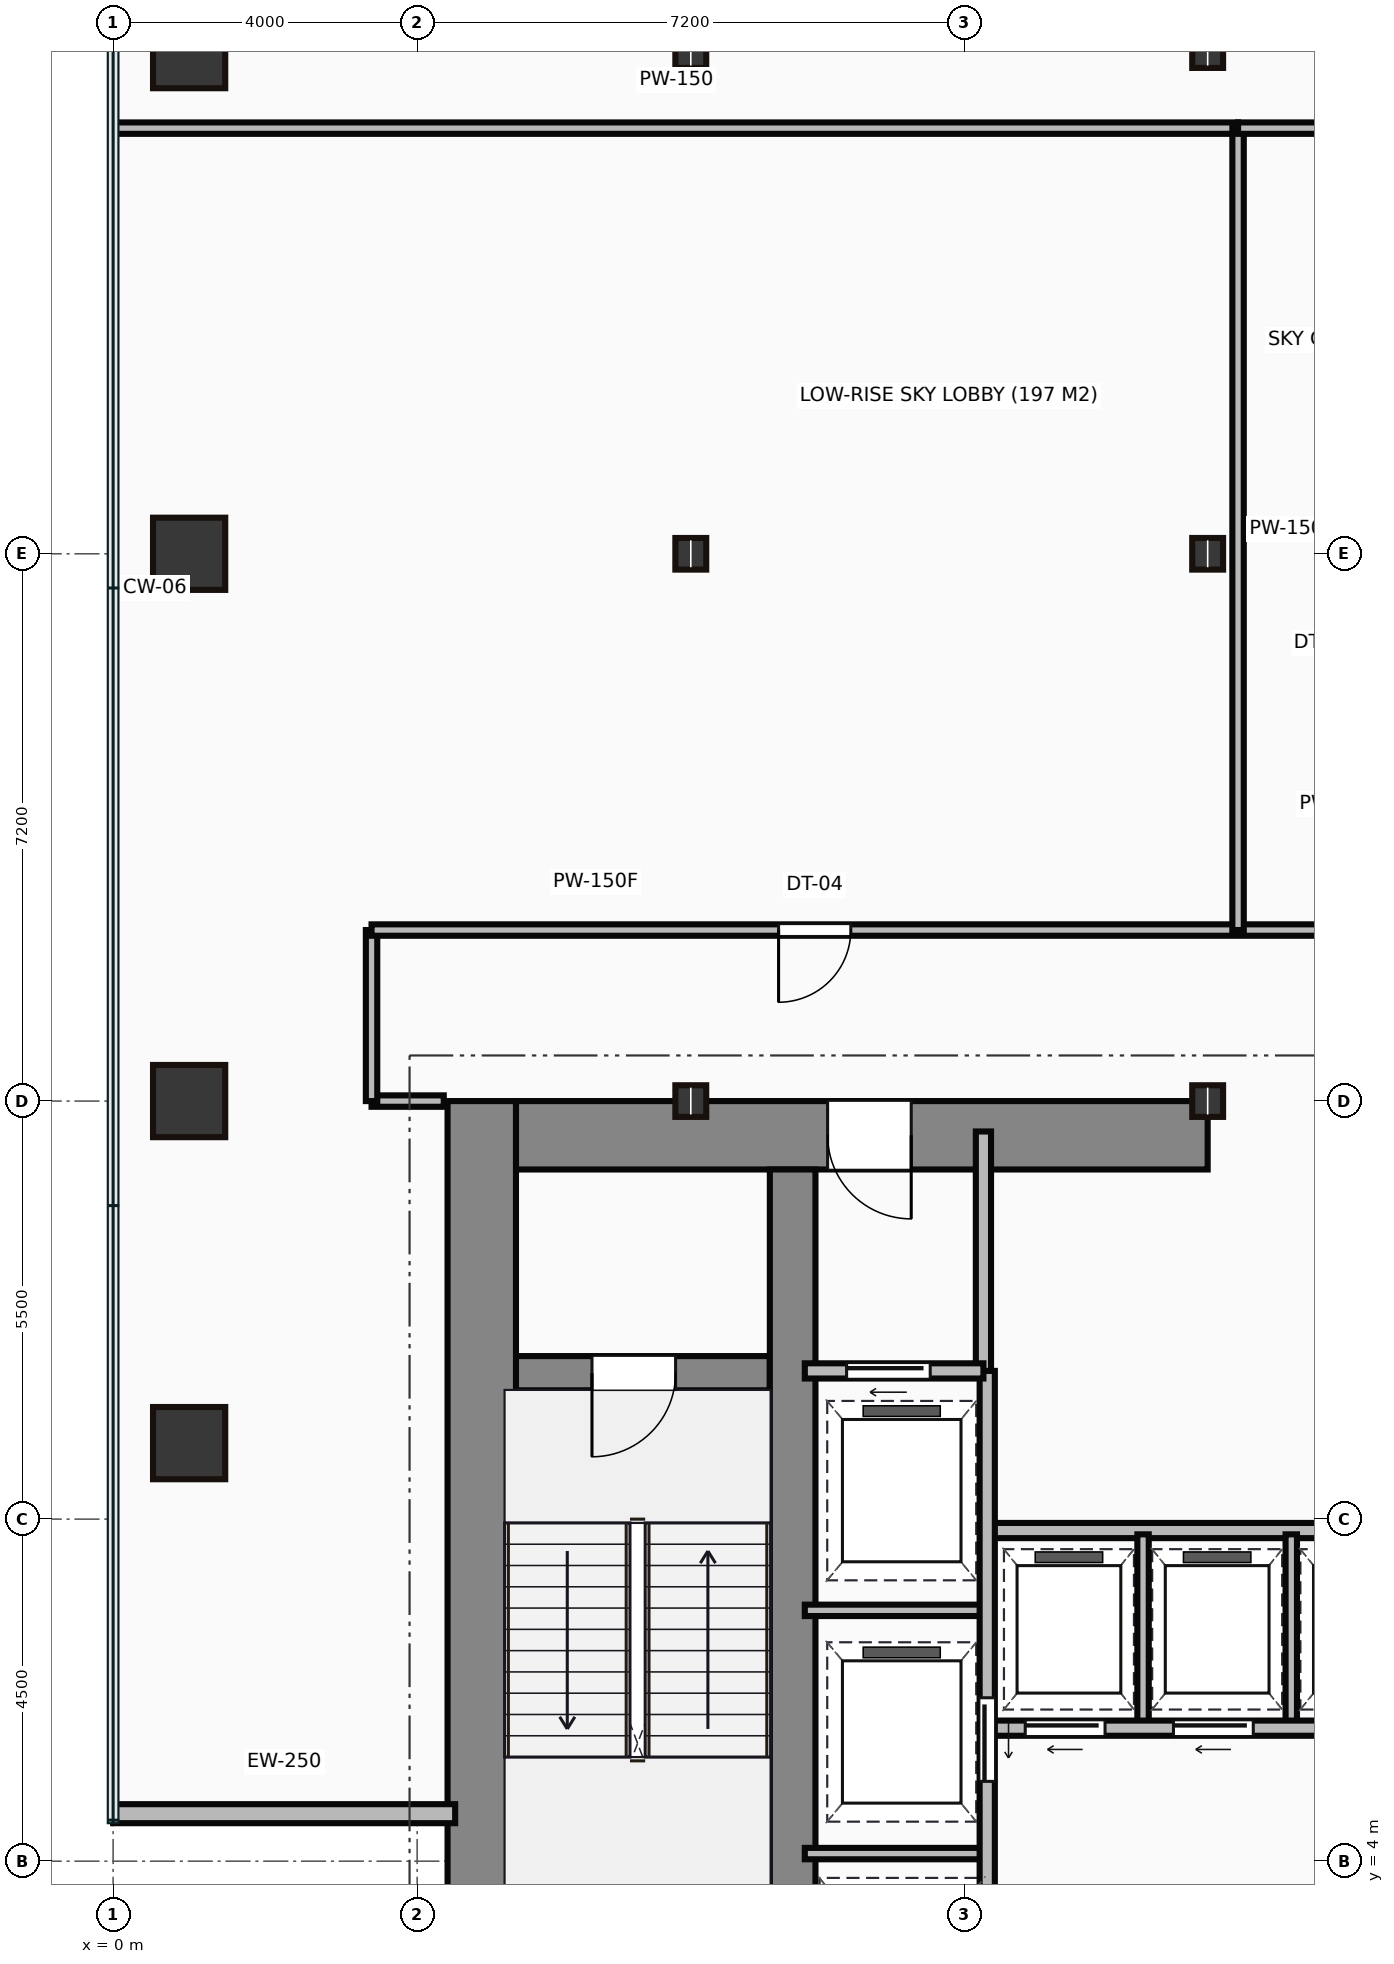
"""IFC4 building model, lengths in metres.
Left out: names, types, materials, properties, quantities, classifications, styles, units other than length and angle.
Written with IfcOpenShell. Run it as: python <this file> out.ifc"""

import sys

from ifc_helpers import new_model, si_unit, direction, frame, frame_2d, origin, origin_2d, place, context, subcontext, project, spatial, rectangle, hollow_rectangle, i_section, extrude, source, transform, mapped, element, fill, save


model = new_model("IFC4")
c1 = context("Model", 3, precision=1e-05, world=origin(), true_north=direction((0.0, 1.0)))
c2 = subcontext(c1, "Body", "Model", "MODEL_VIEW")
j1 = project(units=[si_unit("LENGTHUNIT", "METRE"), si_unit("PLANEANGLEUNIT", "RADIAN")], contexts=[c1])
p1 = place(None, origin())
s1 = spatial("IfcSite", under=j1, at=p1, CompositionType="ELEMENT")
p2 = place(p1, origin())
s2 = spatial("IfcBuilding", under=s1, at=p2, CompositionType="ELEMENT")
p3 = place(p2, frame((0.0, 0.0, 79.95)))
s3 = spatial("IfcBuildingStorey", under=s2, at=p3, CompositionType="ELEMENT", Elevation=79.95)
m1 = source(origin(), c2, "Body", "SweptSolid", [
    extrude(rectangle(XDim=13.1, YDim=0.9, at=frame_2d((6.55, 0.0))), origin(), (0.0, 0.0, 1.0), 4.2),
])
p4 = place(p3, frame((4.85, 0.9, 0.0), z_axis=(0.0, 0.0, 1.0), x_axis=(0.0, 1.0, 0.0)))
e1 = element("IfcWall", 1, at=p4, inside=s3, PredefinedType="SHEAR", context=c2, shape_type="MappedRepresentation", body=[
    mapped(m1, transform((0.0, 0.0, 0.0))),
])
m2 = source(origin(), c2, "Body", "SweptSolid", [
    extrude(rectangle(XDim=9.1, YDim=0.9, at=frame_2d((4.55, 0.0))), origin(), (0.0, 0.0, 1.0), 4.2),
])
p5 = place(p3, frame((5.3, 13.55, 0.0), z_axis=(0.0, 0.0, 1.0), x_axis=(1.0, 0.0, 0.0)))
e2 = element("IfcWall", 2, at=p5, inside=s3, PredefinedType="SHEAR", context=c2, shape_type="MappedRepresentation", body=[
    mapped(m2, transform((0.0, 0.0, 0.0))),
])
p6 = place(p5, frame((4.1, 0.0, 0.0)))
e3 = element("IfcOpeningElement", 3, at=p6, cuts=e2, PredefinedType="OPENING", context=c2, shape_type="SweptSolid", body=[
    extrude(rectangle(XDim=1.1, YDim=2.15, at=frame_2d((0.55, 1.075))), frame((0.0, 0.46, 0.0), z_axis=(0.0, -1.0, 0.0), x_axis=(1.0, 0.0, 0.0)), (0.0, 0.0, 1.0), 0.92),
])
m3 = source(origin(), c2, "Body", "SweptSolid", [
    extrude(rectangle(XDim=12.2, YDim=0.6, at=frame_2d((6.1, 0.0))), origin(), (0.0, 0.0, 1.0), 4.2),
])
p7 = place(p3, frame((8.94, 0.9, 0.0), z_axis=(0.0, 0.0, 1.0), x_axis=(0.0, 1.0, 0.0)))
e4 = element("IfcWall", 4, at=p7, inside=s3, PredefinedType="SHEAR", context=c2, shape_type="MappedRepresentation", body=[
    mapped(m3, transform((0.0, 0.0, 0.0))),
])
m4 = source(origin(), c2, "Body", "SweptSolid", [
    extrude(rectangle(XDim=3.39, YDim=0.45, at=frame_2d((1.695, 0.0))), origin(), (0.0, 0.0, 1.0), 4.2),
])
p8 = place(p3, frame((5.25, 10.42, 0.0), z_axis=(0.0, 0.0, 1.0), x_axis=(1.0, 0.0, 0.0)))
e5 = element("IfcWall", 5, at=p8, inside=s3, PredefinedType="SHEAR", context=c2, shape_type="MappedRepresentation", body=[
    mapped(m4, transform((0.0, 0.0, 0.0))),
])
p9 = place(p8, frame((1.05, 0.0, 0.0)))
e6 = element("IfcOpeningElement", 6, at=p9, cuts=e5, PredefinedType="OPENING", context=c2, shape_type="SweptSolid", body=[
    extrude(rectangle(XDim=1.1, YDim=2.15, at=frame_2d((0.55, 1.075))), frame((0.0, 0.235, 0.0), z_axis=(0.0, -1.0, 0.0), x_axis=(1.0, 0.0, 0.0)), (0.0, 0.0, 1.0), 0.47),
])
m5 = source(origin(), c2, "Body", "SweptSolid", [
    extrude(hollow_rectangle(XDim=0.95, YDim=0.95, WallThickness=0.045, at=origin_2d()), origin(), (0.0, 0.0, 1.0), 4.2),
])
for number, where, z_axis, x_axis in (
    (7, (1.0, 9.5, 0.0), (0.0, 0.0, 1.0), (1.0, 0.0, 0.0)),
    (8, (1.0, 14.0, 0.0), (0.0, 0.0, 1.0), (1.0, 0.0, 0.0)),
    (9, (1.0, 21.2, 0.0), (0.0, 0.0, 1.0), (1.0, 0.0, 0.0)),
    (10, (1.0, 27.8, 0.0), (0.0, 0.0, 1.0), (1.0, 0.0, 0.0)),
):
    element("IfcColumn", number, at=place(p3, frame(where, z_axis=z_axis, x_axis=x_axis)), inside=s3, PredefinedType="COLUMN", context=c2, shape_type="MappedRepresentation", body=[
        mapped(m5, transform((0.0, 0.0, 0.0))),
    ])
m6 = source(origin(), c2, "Body", "SweptSolid", [
    extrude(i_section(OverallWidth=0.406, OverallDepth=0.416, WebThickness=0.03, FlangeThickness=0.048, at=origin_2d()), origin(), (0.0, 0.0, 1.0), 4.2),
])
for number, where, z_axis, x_axis in (
    (11, (7.6, 14.0, 0.0), (0.0, 0.0, 1.0), (1.0, 0.0, 0.0)),
    (12, (7.6, 21.2, 0.0), (0.0, 0.0, 1.0), (1.0, 0.0, 0.0)),
    (13, (7.6, 27.8, 0.0), (0.0, 0.0, 1.0), (1.0, 0.0, 0.0)),
    (14, (14.4, 14.0, 0.0), (0.0, 0.0, 1.0), (1.0, 0.0, 0.0)),
    (15, (14.4, 21.2, 0.0), (0.0, 0.0, 1.0), (1.0, 0.0, 0.0)),
    (16, (14.4, 27.8, 0.0), (0.0, 0.0, 1.0), (1.0, 0.0, 0.0)),
):
    element("IfcColumn", number, at=place(p3, frame(where, z_axis=z_axis, x_axis=x_axis)), inside=s3, PredefinedType="COLUMN", context=c2, shape_type="MappedRepresentation", body=[
        mapped(m6, transform((0.0, 0.0, 0.0))),
    ])
m7 = source(origin(), c2, "Body", "SweptSolid", [
    extrude(rectangle(XDim=4.5, YDim=0.25, at=frame_2d((2.25, 0.0))), origin(), (0.0, 0.0, 1.0), 3.9),
])
p10 = place(p3, frame((0.0, 4.625, 0.0), z_axis=(0.0, 0.0, 1.0), x_axis=(1.0, 0.0, 0.0)))
e17 = element("IfcWall", 17, at=p10, inside=s3, PredefinedType="STANDARD", context=c2, shape_type="MappedRepresentation", body=[
    mapped(m7, transform((0.0, 0.0, 0.0))),
])
m8 = source(origin(), c2, "Body", "SweptSolid", [
    extrude(rectangle(XDim=3.18, YDim=0.2, at=frame_2d((1.59, 0.0))), origin(), (0.0, 0.0, 1.0), 3.9),
])
p11 = place(p3, frame((11.45, 10.42, 0.0), z_axis=(0.0, 0.0, 1.0), x_axis=(0.0, 1.0, 0.0)))
e18 = element("IfcWall", 18, at=p11, inside=s3, PredefinedType="PARTITIONING", context=c2, shape_type="MappedRepresentation", body=[
    mapped(m8, transform((0.0, 0.0, 0.0))),
])
m9 = source(origin(), c2, "Body", "SweptSolid", [
    extrude(rectangle(XDim=2.35, YDim=0.2, at=frame_2d((1.175, 0.0))), origin(), (0.0, 0.0, 1.0), 3.9),
])
p12 = place(p3, frame((9.1, 10.45, 0.0), z_axis=(0.0, 0.0, 1.0), x_axis=(1.0, 0.0, 0.0)))
e19 = element("IfcWall", 19, at=p12, inside=s3, PredefinedType="PARTITIONING", context=c2, shape_type="MappedRepresentation", body=[
    mapped(m9, transform((0.0, 0.0, 0.0))),
])
p13 = place(p12, frame((0.55, 0.0, 0.0)))
e20 = element("IfcOpeningElement", 20, at=p13, cuts=e19, PredefinedType="OPENING", context=c2, shape_type="SweptSolid", body=[
    extrude(rectangle(XDim=1.1, YDim=2.15, at=frame_2d((0.55, 1.075))), frame((0.0, 0.11, 0.0), z_axis=(0.0, -1.0, 0.0), x_axis=(1.0, 0.0, 0.0)), (0.0, 0.0, 1.0), 0.22),
])
m10 = source(origin(), c2, "Body", "SweptSolid", [
    extrude(rectangle(XDim=9.6, YDim=0.2, at=frame_2d((4.8, 0.0))), origin(), (0.0, 0.0, 1.0), 3.9),
])
p14 = place(p3, frame((11.5, 0.85, 0.0), z_axis=(0.0, 0.0, 1.0), x_axis=(0.0, 1.0, 0.0)))
e21 = element("IfcWall", 21, at=p14, inside=s3, PredefinedType="PARTITIONING", context=c2, shape_type="MappedRepresentation", body=[
    mapped(m10, transform((0.0, 0.0, 0.0))),
])
p15 = place(p14, frame((4.2, 0.0, 0.0)))
e22 = element("IfcOpeningElement", 22, at=p15, cuts=e21, PredefinedType="OPENING", context=c2, shape_type="SweptSolid", body=[
    extrude(rectangle(XDim=1.1, YDim=2.15, at=frame_2d((0.55, 1.075))), frame((0.0, 0.11, 0.0), z_axis=(0.0, -1.0, 0.0), x_axis=(1.0, 0.0, 0.0)), (0.0, 0.0, 1.0), 0.22),
])
p16 = place(p14, frame((0.9, 0.0, 0.0)))
e23 = element("IfcOpeningElement", 23, at=p16, cuts=e21, PredefinedType="OPENING", context=c2, shape_type="SweptSolid", body=[
    extrude(rectangle(XDim=1.2, YDim=2.15, at=frame_2d((0.6, 1.075))), frame((0.0, 0.11, 0.0), z_axis=(0.0, -1.0, 0.0), x_axis=(1.0, 0.0, 0.0)), (0.0, 0.0, 1.0), 0.22),
])
m11 = source(origin(), c2, "Body", "SweptSolid", [
    extrude(rectangle(XDim=2.4, YDim=0.15, at=frame_2d((1.2, 0.0))), origin(), (0.0, 0.0, 1.0), 3.9),
])
for number, where, z_axis, x_axis in (
    (24, (9.1, 4.1, 0.0), (0.0, 0.0, 1.0), (1.0, 0.0, 0.0)),
    (25, (9.1, 7.3, 0.0), (0.0, 0.0, 1.0), (1.0, 0.0, 0.0)),
):
    element("IfcWall", number, at=place(p3, frame(where, z_axis=z_axis, x_axis=x_axis)), inside=s3, PredefinedType="PARTITIONING", context=c2, shape_type="MappedRepresentation", body=[
        mapped(m11, transform((0.0, 0.0, 0.0))),
    ])
m12 = source(origin(), c2, "Body", "SweptSolid", [
    extrude(rectangle(XDim=11.85, YDim=0.2, at=frame_2d((5.925, 0.0))), origin(), (0.0, 0.0, 1.0), 3.9),
])
p17 = place(p3, frame((11.55, 5.75, 0.0), z_axis=(0.0, 0.0, 1.0), x_axis=(1.0, 0.0, 0.0)))
e26 = element("IfcWall", 26, at=p17, inside=s3, PredefinedType="PARTITIONING", context=c2, shape_type="MappedRepresentation", body=[
    mapped(m12, transform((0.0, 0.0, 0.0))),
])
p18 = place(p17, frame((0.45, 0.0, 0.0)))
e27 = element("IfcOpeningElement", 27, at=p18, cuts=e26, PredefinedType="OPENING", context=c2, shape_type="SweptSolid", body=[
    extrude(rectangle(XDim=1.05, YDim=2.15, at=frame_2d((0.525, 1.075))), frame((0.0, 0.11, 0.0), z_axis=(0.0, -1.0, 0.0), x_axis=(1.0, 0.0, 0.0)), (0.0, 0.0, 1.0), 0.22),
])
p19 = place(p17, frame((2.4, 0.0, 0.0)))
e28 = element("IfcOpeningElement", 28, at=p19, cuts=e26, PredefinedType="OPENING", context=c2, shape_type="SweptSolid", body=[
    extrude(rectangle(XDim=1.05, YDim=2.15, at=frame_2d((0.525, 1.075))), frame((0.0, 0.11, 0.0), z_axis=(0.0, -1.0, 0.0), x_axis=(1.0, 0.0, 0.0)), (0.0, 0.0, 1.0), 0.22),
])
p20 = place(p17, frame((4.35, 0.0, 0.0)))
e29 = element("IfcOpeningElement", 29, at=p20, cuts=e26, PredefinedType="OPENING", context=c2, shape_type="SweptSolid", body=[
    extrude(rectangle(XDim=1.05, YDim=2.15, at=frame_2d((0.525, 1.075))), frame((0.0, 0.11, 0.0), z_axis=(0.0, -1.0, 0.0), x_axis=(1.0, 0.0, 0.0)), (0.0, 0.0, 1.0), 0.22),
])
p21 = place(p17, frame((6.3, 0.0, 0.0)))
e30 = element("IfcOpeningElement", 30, at=p21, cuts=e26, PredefinedType="OPENING", context=c2, shape_type="SweptSolid", body=[
    extrude(rectangle(XDim=1.05, YDim=2.15, at=frame_2d((0.525, 1.075))), frame((0.0, 0.11, 0.0), z_axis=(0.0, -1.0, 0.0), x_axis=(1.0, 0.0, 0.0)), (0.0, 0.0, 1.0), 0.22),
])
p22 = place(p17, frame((8.25, 0.0, 0.0)))
e31 = element("IfcOpeningElement", 31, at=p22, cuts=e26, PredefinedType="OPENING", context=c2, shape_type="SweptSolid", body=[
    extrude(rectangle(XDim=1.05, YDim=2.15, at=frame_2d((0.525, 1.075))), frame((0.0, 0.11, 0.0), z_axis=(0.0, -1.0, 0.0), x_axis=(1.0, 0.0, 0.0)), (0.0, 0.0, 1.0), 0.22),
])
p23 = place(p17, frame((10.2, 0.0, 0.0)))
e32 = element("IfcOpeningElement", 32, at=p23, cuts=e26, PredefinedType="OPENING", context=c2, shape_type="SweptSolid", body=[
    extrude(rectangle(XDim=1.05, YDim=2.15, at=frame_2d((0.525, 1.075))), frame((0.0, 0.11, 0.0), z_axis=(0.0, -1.0, 0.0), x_axis=(1.0, 0.0, 0.0)), (0.0, 0.0, 1.0), 0.22),
])
p24 = place(p3, frame((11.55, 8.35, 0.0), z_axis=(0.0, 0.0, 1.0), x_axis=(1.0, 0.0, 0.0)))
e33 = element("IfcWall", 33, at=p24, inside=s3, PredefinedType="PARTITIONING", context=c2, shape_type="MappedRepresentation", body=[
    mapped(m12, transform((0.0, 0.0, 0.0))),
])
m13 = source(origin(), c2, "Body", "SweptSolid", [
    extrude(rectangle(XDim=2.5, YDim=0.15, at=frame_2d((1.25, 0.0))), origin(), (0.0, 0.0, 1.0), 3.9),
])
for number, where, z_axis, x_axis in (
    (34, (13.55, 5.8, 0.0), (0.0, 0.0, 1.0), (0.0, 1.0, 0.0)),
    (35, (15.5, 5.8, 0.0), (0.0, 0.0, 1.0), (0.0, 1.0, 0.0)),
):
    element("IfcWall", number, at=place(p3, frame(where, z_axis=z_axis, x_axis=x_axis)), inside=s3, PredefinedType="PARTITIONING", context=c2, shape_type="MappedRepresentation", body=[
        mapped(m13, transform((0.0, 0.0, 0.0))),
    ])
m14 = source(origin(), c2, "Body", "SweptSolid", [
    extrude(rectangle(XDim=0.95, YDim=0.15, at=frame_2d((0.475, 0.0))), origin(), (0.0, 0.0, 1.0), 3.125),
])
p25 = place(p3, frame((4.35, 14.0, 0.0), z_axis=(0.0, 0.0, 1.0), x_axis=(-1.0, 0.0, 0.0)))
e36 = element("IfcWall", 36, at=p25, inside=s3, PredefinedType="PARTITIONING", context=c2, shape_type="MappedRepresentation", body=[
    mapped(m14, transform((0.0, 0.0, 0.0))),
])
m15 = source(origin(), c2, "Body", "SweptSolid", [
    extrude(rectangle(XDim=2.25, YDim=0.15, at=frame_2d((1.125, 0.0))), origin(), (0.0, 0.0, 1.0), 3.9),
])
p26 = place(p3, frame((3.4, 14.0, 0.0), z_axis=(0.0, 0.0, 1.0), x_axis=(0.0, 1.0, 0.0)))
e37 = element("IfcWall", 37, at=p26, inside=s3, PredefinedType="PARTITIONING", context=c2, shape_type="MappedRepresentation", body=[
    mapped(m15, transform((0.0, 0.0, 0.0))),
])
m16 = source(origin(), c2, "Body", "SweptSolid", [
    extrude(rectangle(XDim=13.4, YDim=0.15, at=frame_2d((6.7, 0.0))), origin(), (0.0, 0.0, 1.0), 3.9),
])
p27 = place(p3, frame((3.4, 16.25, 0.0), z_axis=(0.0, 0.0, 1.0), x_axis=(1.0, 0.0, 0.0)))
e38 = element("IfcWall", 38, at=p27, inside=s3, PredefinedType="PARTITIONING", context=c2, shape_type="MappedRepresentation", body=[
    mapped(m16, transform((0.0, 0.0, 0.0))),
])
p28 = place(p27, frame((5.355, 0.0, 0.0)))
e39 = element("IfcOpeningElement", 39, at=p28, cuts=e38, PredefinedType="OPENING", context=c2, shape_type="SweptSolid", body=[
    extrude(rectangle(XDim=0.95, YDim=2.15, at=frame_2d((0.475, 1.075))), frame((0.0, 0.085, 0.0), z_axis=(0.0, -1.0, 0.0), x_axis=(1.0, 0.0, 0.0)), (0.0, 0.0, 1.0), 0.17),
])
m17 = source(origin(), c2, "Body", "SweptSolid", [
    extrude(rectangle(XDim=14.78, YDim=0.15, at=frame_2d((7.39, 0.0))), origin(), (0.0, 0.0, 1.0), 3.9),
])
p29 = place(p3, frame((0.02, 26.8, 0.0), z_axis=(0.0, 0.0, 1.0), x_axis=(1.0, 0.0, 0.0)))
e40 = element("IfcWall", 40, at=p29, inside=s3, PredefinedType="PARTITIONING", context=c2, shape_type="MappedRepresentation", body=[
    mapped(m17, transform((0.0, 0.0, 0.0))),
])
m18 = source(origin(), c2, "Body", "SweptSolid", [
    extrude(rectangle(XDim=10.55, YDim=0.15, at=frame_2d((5.275, 0.0))), origin(), (0.0, 0.0, 1.0), 3.9),
])
p30 = place(p3, frame((14.8, 26.8, 0.0), z_axis=(0.0, 0.0, 1.0), x_axis=(0.0, -1.0, 0.0)))
e41 = element("IfcWall", 41, at=p30, inside=s3, PredefinedType="PARTITIONING", context=c2, shape_type="MappedRepresentation", body=[
    mapped(m18, transform((0.0, 0.0, 0.0))),
])
m19 = source(origin(), c2, "Body", "SweptSolid", [
    extrude(rectangle(XDim=2.0, YDim=0.15, at=frame_2d((1.0, 0.0))), origin(), (0.0, 0.0, 1.0), 3.9),
])
p31 = place(p3, frame((14.8, 26.8, 0.0), z_axis=(0.0, 0.0, 1.0), x_axis=(1.0, 0.0, 0.0)))
e42 = element("IfcWall", 42, at=p31, inside=s3, PredefinedType="PARTITIONING", context=c2, shape_type="MappedRepresentation", body=[
    mapped(m19, transform((0.0, 0.0, 0.0))),
])
m20 = source(origin(), c2, "Body", "SweptSolid", [
    extrude(rectangle(XDim=1.1, YDim=2.15, at=frame_2d((0.55, 1.075))), frame((0.0, 0.025, 0.0), z_axis=(0.0, -1.0, 0.0), x_axis=(1.0, 0.0, 0.0)), (0.0, 0.0, 1.0), 0.05),
])
p32 = place(p9, frame((1.1, 0.0, 0.0), z_axis=(0.0, 0.0, 1.0), x_axis=(-1.0, 0.0, 0.0)))
e43 = element("IfcDoor", 43, at=p32, inside=s3, OperationType="SINGLE_SWING_LEFT", PredefinedType="DOOR", context=c2, shape_type="MappedRepresentation", body=[
    mapped(m20, transform((0.0, 0.0, 0.0))),
])
fill(e6, e43)
p33 = place(p6, origin())
e44 = element("IfcDoor", 44, at=p33, inside=s3, OperationType="SINGLE_SWING_RIGHT", PredefinedType="DOOR", context=c2, shape_type="MappedRepresentation", body=[
    mapped(m20, transform((0.0, 0.0, 0.0))),
])
fill(e3, e44)
p34 = place(p13, origin())
e45 = element("IfcDoor", 45, at=p34, inside=s3, OperationType="SLIDING_TO_LEFT", PredefinedType="DOOR", context=c2, shape_type="MappedRepresentation", body=[
    mapped(m20, transform((0.0, 0.0, 0.0))),
])
fill(e20, e45)
p35 = place(p15, frame((1.1, 0.0, 0.0), z_axis=(0.0, 0.0, 1.0), x_axis=(-1.0, 0.0, 0.0)))
e46 = element("IfcDoor", 46, at=p35, inside=s3, OperationType="SLIDING_TO_LEFT", PredefinedType="DOOR", context=c2, shape_type="MappedRepresentation", body=[
    mapped(m20, transform((0.0, 0.0, 0.0))),
])
fill(e22, e46)
m21 = source(origin(), c2, "Body", "SweptSolid", [
    extrude(rectangle(XDim=1.05, YDim=2.15, at=frame_2d((0.525, 1.075))), frame((0.0, 0.025, 0.0), z_axis=(0.0, -1.0, 0.0), x_axis=(1.0, 0.0, 0.0)), (0.0, 0.0, 1.0), 0.05),
])
p36 = place(p18, frame((1.05, 0.0, 0.0), z_axis=(0.0, 0.0, 1.0), x_axis=(-1.0, 0.0, 0.0)))
e47 = element("IfcDoor", 47, at=p36, inside=s3, OperationType="SLIDING_TO_LEFT", PredefinedType="DOOR", context=c2, shape_type="MappedRepresentation", body=[
    mapped(m21, transform((0.0, 0.0, 0.0))),
])
fill(e27, e47)
p37 = place(p19, frame((1.05, 0.0, 0.0), z_axis=(0.0, 0.0, 1.0), x_axis=(-1.0, 0.0, 0.0)))
e48 = element("IfcDoor", 48, at=p37, inside=s3, OperationType="SLIDING_TO_LEFT", PredefinedType="DOOR", context=c2, shape_type="MappedRepresentation", body=[
    mapped(m21, transform((0.0, 0.0, 0.0))),
])
fill(e28, e48)
m22 = source(origin(), c2, "Body", "SweptSolid", [
    extrude(rectangle(XDim=0.95, YDim=2.15, at=frame_2d((0.475, 1.075))), frame((0.0, 0.025, 0.0), z_axis=(0.0, -1.0, 0.0), x_axis=(1.0, 0.0, 0.0)), (0.0, 0.0, 1.0), 0.05),
])
p38 = place(p28, origin())
e49 = element("IfcDoor", 49, at=p38, inside=s3, OperationType="SINGLE_SWING_LEFT", PredefinedType="DOOR", context=c2, shape_type="MappedRepresentation", body=[
    mapped(m22, transform((0.0, 0.0, 0.0))),
])
fill(e39, e49)
save(model, sys.argv[1])
